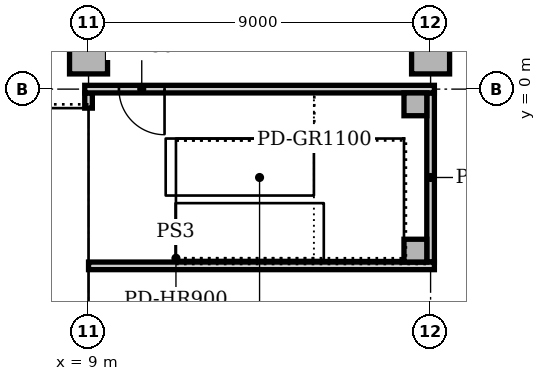
"""IFC4 building model, lengths in metres.
Left out: names, types, materials, properties, quantities, classifications, styles, units other than length and angle.
Written with IfcOpenShell. Run it as: python <this file> out.ifc"""

import sys

from ifc_helpers import new_model, si_unit, direction, frame, frame_2d, origin, origin_2d, place, context, subcontext, project, spatial, rectangle, extrude, element, fill, save


model = new_model("IFC4")
c1 = context("Model", 3, precision=1e-05, world=origin(), true_north=direction((0.0, 1.0)))
c2 = subcontext(c1, "Body", "Model", "MODEL_VIEW")
j1 = project(units=[si_unit("LENGTHUNIT", "METRE"), si_unit("PLANEANGLEUNIT", "RADIAN")], contexts=[c1])
p1 = place(None, origin())
s1 = spatial("IfcSite", under=j1, at=p1, CompositionType="ELEMENT")
p2 = place(p1, origin())
s2 = spatial("IfcBuilding", under=s1, at=p2, CompositionType="ELEMENT")
p3 = place(p2, frame((0.0, 0.0, -5.0)))
s3 = spatial("IfcBuildingStorey", under=s2, at=p3, CompositionType="ELEMENT", Elevation=-5.0)
for number, where, z_axis, x_axis in (
    (1, (9.0, 0.9, 0.0), (0.0, 0.0, 1.0), (1.0, 0.0, 0.0)),
    (2, (18.0, 0.9, 0.0), (0.0, 0.0, 1.0), (1.0, 0.0, 0.0)),
):
    element("IfcColumn", number, at=place(p3, frame(where, z_axis=z_axis, x_axis=x_axis)), inside=s3, PredefinedType="COLUMN", context=c2, shape_type="SweptSolid", body=[
        extrude(rectangle(XDim=1.0, YDim=1.0, at=origin_2d()), origin(), (0.0, 0.0, 1.0), 4.7),
    ])
for number, where, z_axis, x_axis in (
    (3, (17.6, -4.25, 0.0), (0.0, 0.0, 1.0), (1.0, 0.0, 0.0)),
    (4, (17.6, -0.4, 0.0), (0.0, 0.0, 1.0), (1.0, 0.0, 0.0)),
):
    element("IfcColumn", number, at=place(p3, frame(where, z_axis=z_axis, x_axis=x_axis)), inside=s3, PredefinedType="COLUMN", context=c2, shape_type="SweptSolid", body=[
        extrude(rectangle(XDim=0.6, YDim=0.6, at=origin_2d()), origin(), (0.0, 0.0, 1.0), 5.0),
    ])
p4 = place(p3, frame((18.0, -4.55, 0.0), z_axis=(0.0, 0.0, 1.0), x_axis=(0.0, 1.0, 0.0)))
e5 = element("IfcWall", 5, at=p4, inside=s3, PredefinedType="SOLIDWALL", context=c2, shape_type="SweptSolid", body=[
    extrude(rectangle(XDim=4.45, YDim=0.2, at=frame_2d((2.225, 0.0))), origin(), (0.0, 0.0, 1.0), 4.7),
])
p5 = place(p3, frame((9.0, -4.65, 0.0), z_axis=(0.0, 0.0, 1.0), x_axis=(1.0, 0.0, 0.0)))
e6 = element("IfcWall", 6, at=p5, inside=s3, PredefinedType="SOLIDWALL", context=c2, shape_type="SweptSolid", body=[
    extrude(rectangle(XDim=9.1, YDim=0.2, at=frame_2d((4.55, 0.0))), origin(), (0.0, 0.0, 1.0), 4.7),
])
p6 = place(p3, frame((9.0, -0.5, 0.0), z_axis=(0.0, 0.0, 1.0), x_axis=(0.0, 1.0, 0.0)))
e7 = element("IfcWall", 7, at=p6, inside=s3, PredefinedType="SOLIDWALL", context=c2, shape_type="SweptSolid", body=[
    extrude(rectangle(XDim=0.4, YDim=0.2, at=frame_2d((0.2, 0.0))), origin(), (0.0, 0.0, 1.0), 4.7),
])
p7 = place(p3, frame((8.9, 0.0, 0.0), z_axis=(0.0, 0.0, 1.0), x_axis=(1.0, 0.0, 0.0)))
e8 = element("IfcWall", 8, at=p7, inside=s3, PredefinedType="SOLIDWALL", context=c2, shape_type="SweptSolid", body=[
    extrude(rectangle(XDim=9.2, YDim=0.2, at=frame_2d((4.6, 0.0))), origin(), (0.0, 0.0, 1.0), 4.7),
])
p8 = place(p7, frame((0.9, 0.0, 0.0)))
e9 = element("IfcOpeningElement", 9, at=p8, cuts=e8, PredefinedType="OPENING", context=c2, shape_type="SweptSolid", body=[
    extrude(rectangle(XDim=1.2, YDim=2.1, at=frame_2d((0.6, 1.05))), frame((0.0, 0.11, 0.0), z_axis=(0.0, -1.0, 0.0), x_axis=(1.0, 0.0, 0.0)), (0.0, 0.0, 1.0), 0.22),
])
p9 = place(p8, frame((1.2, 0.0, 0.0), z_axis=(0.0, 0.0, 1.0), x_axis=(-1.0, 0.0, 0.0)))
e10 = element("IfcDoor", 10, at=p9, inside=s3, OperationType="SINGLE_SWING_LEFT", PredefinedType="DOOR", context=c2, shape_type="SweptSolid", body=[
    extrude(rectangle(XDim=1.2, YDim=2.1, at=frame_2d((0.6, 1.05))), frame((0.0, 0.025, 0.0), z_axis=(0.0, -1.0, 0.0), x_axis=(1.0, 0.0, 0.0)), (0.0, 0.0, 1.0), 0.05),
])
fill(e9, e10)
save(model, sys.argv[1])
